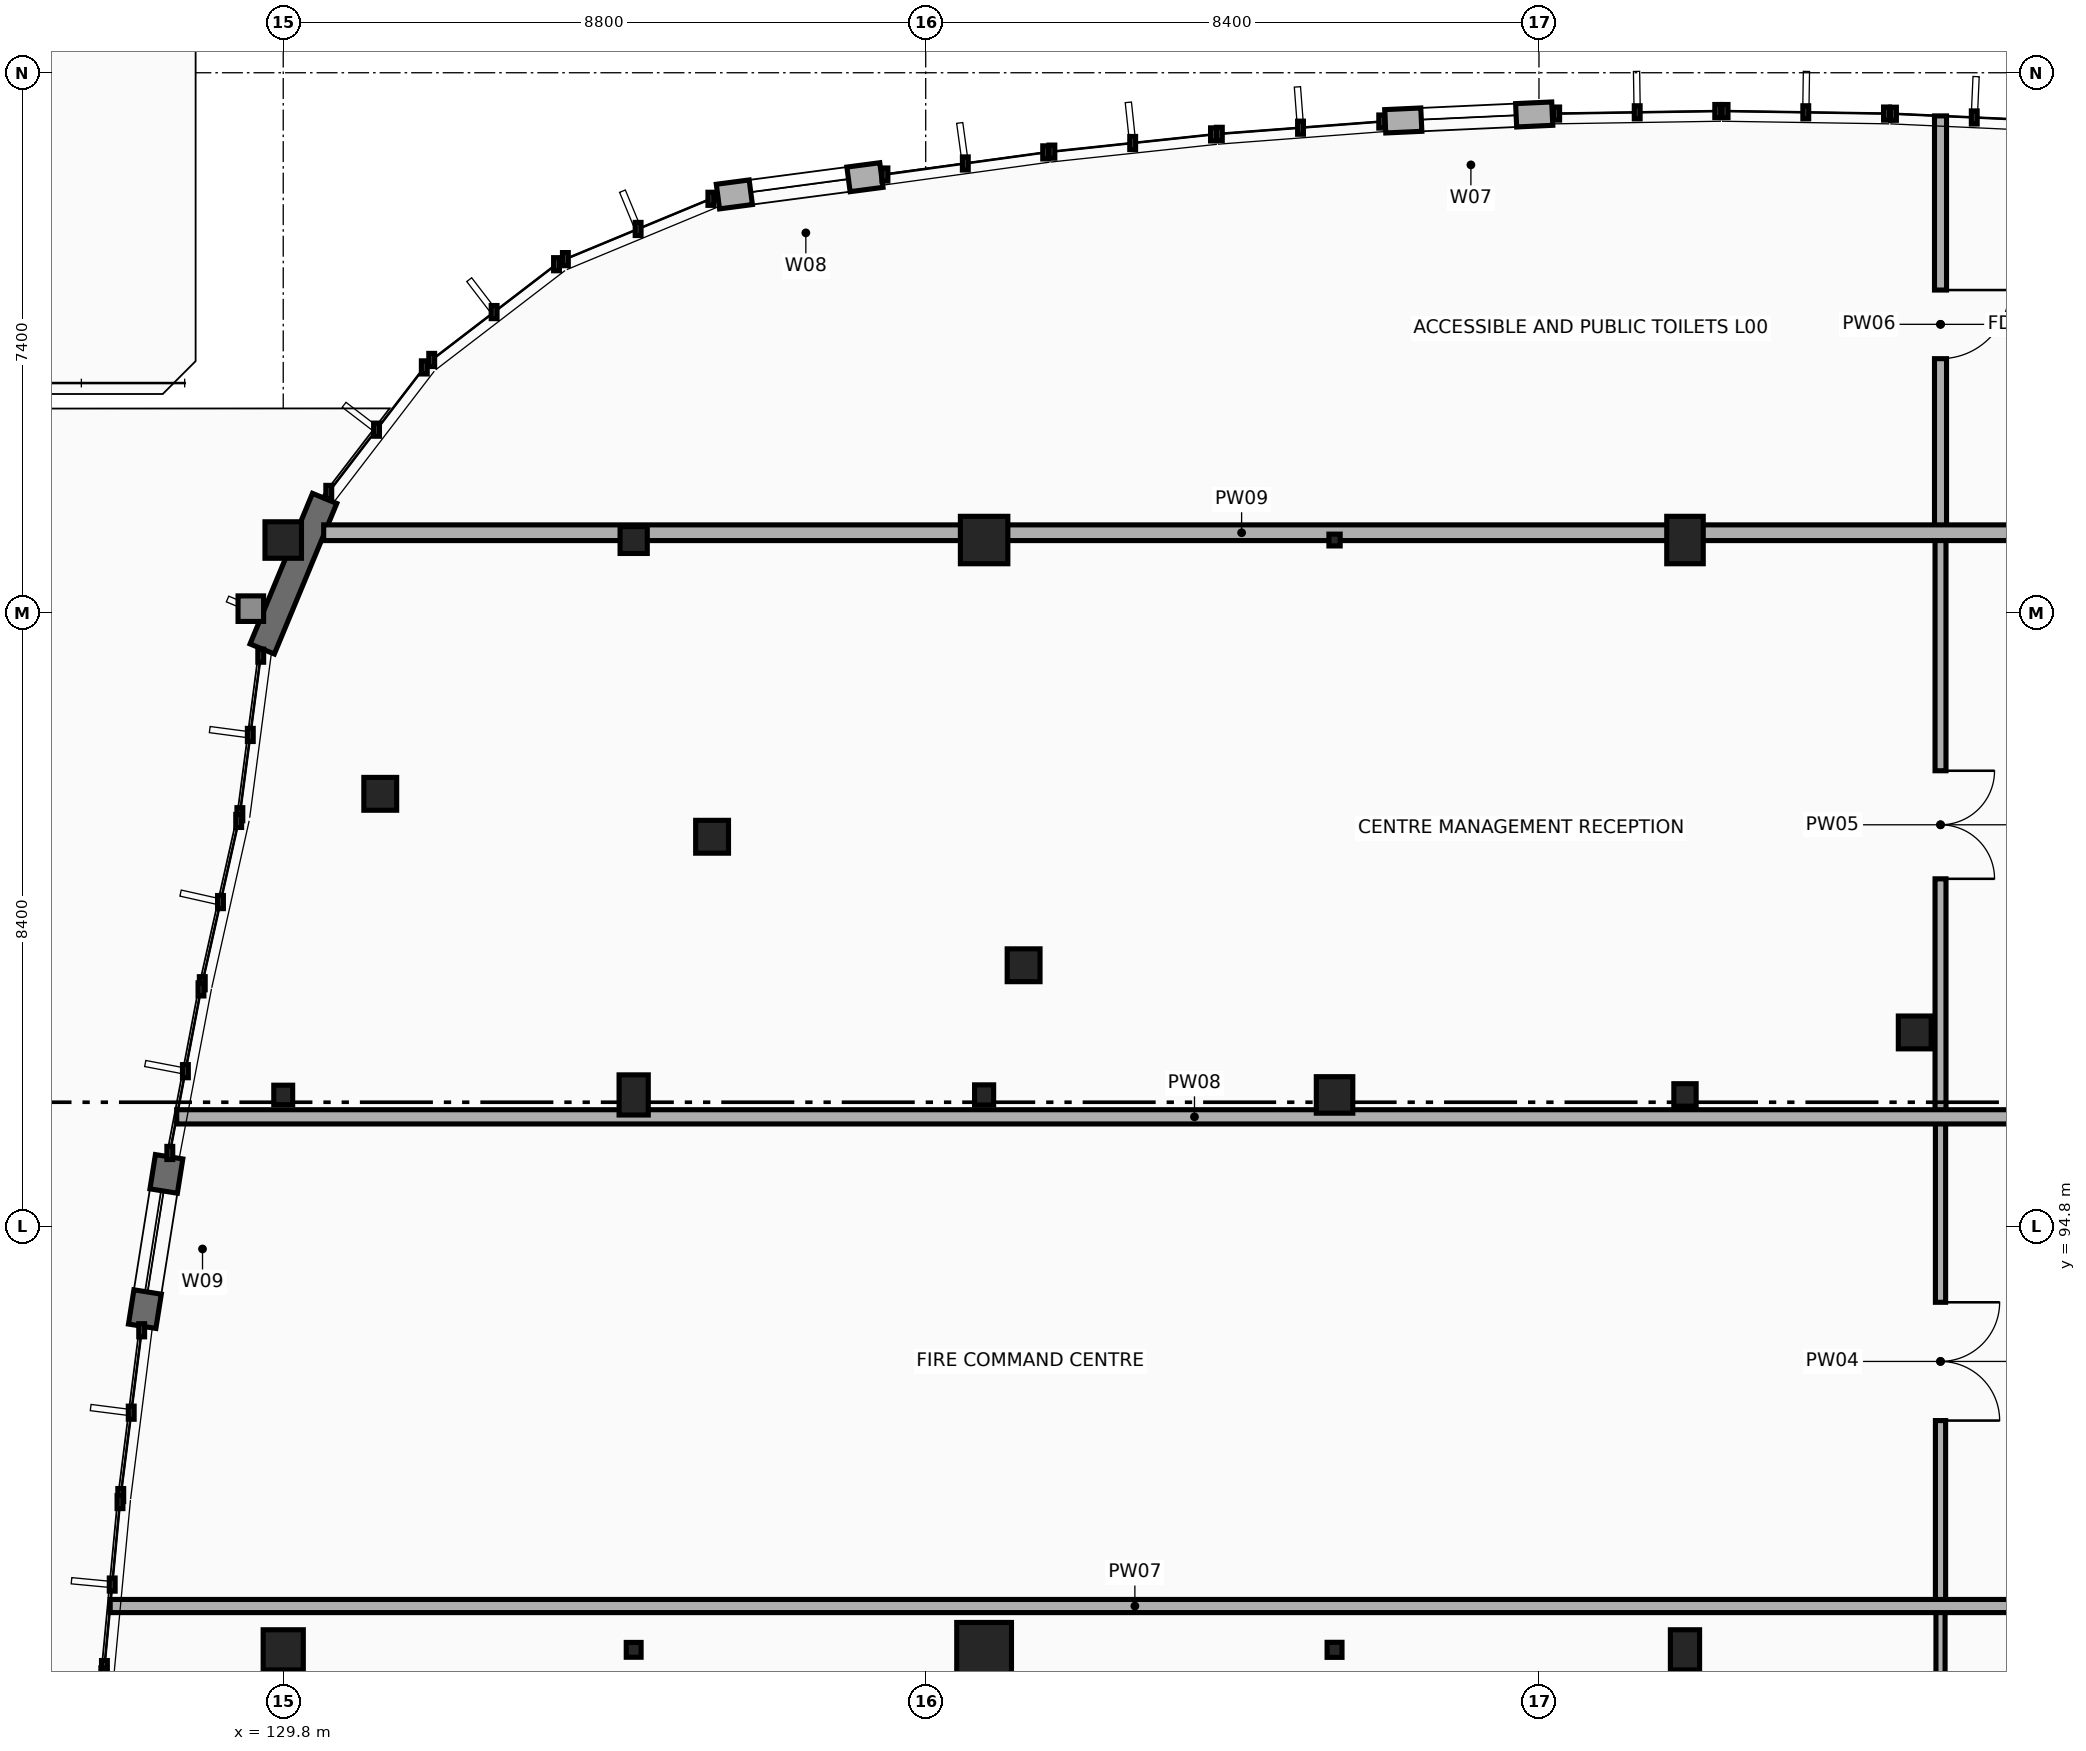
"""IFC4 building model, lengths in metres.
Left out: names, types, materials, properties, quantities, classifications, styles, units other than length and angle.
Written with IfcOpenShell. Run it as: python <this file> out.ifc"""

import sys

from ifc_helpers import new_model, si_unit, direction, frame, frame_2d, origin, origin_2d, place, context, subcontext, project, spatial, rectangle, i_section, extrude, element, fill, save


model = new_model("IFC4")
c1 = context("Model", 3, precision=1e-05, world=origin(), true_north=direction((0.0, 1.0)))
c2 = subcontext(c1, "Body", "Model", "MODEL_VIEW")
j1 = project(units=[si_unit("LENGTHUNIT", "METRE"), si_unit("PLANEANGLEUNIT", "RADIAN")], contexts=[c1])
p1 = place(None, origin())
s1 = spatial("IfcSite", under=j1, at=p1, CompositionType="ELEMENT")
p2 = place(p1, origin())
s2 = spatial("IfcBuilding", under=s1, at=p2, CompositionType="ELEMENT")
p3 = place(p2, origin())
s3 = spatial("IfcBuildingStorey", under=s2, at=p3, CompositionType="ELEMENT", Elevation=0.0)
p4 = place(p3, frame((129.8, 89.0, 0.0), z_axis=(0.0, 0.0, 1.0), x_axis=(1.0, 0.0, 0.0)))
e1 = element("IfcColumn", 1, at=p4, inside=s3, PredefinedType="COLUMN", context=c2, shape_type="SweptSolid", body=[
    extrude(rectangle(XDim=0.55, YDim=0.55, at=origin_2d()), origin(), (0.0, 0.0, 1.0), 4.8),
])
p5 = place(p3, frame((129.8, 96.6, 0.0), z_axis=(0.0, 0.0, 1.0), x_axis=(1.0, 0.0, 0.0)))
e2 = element("IfcColumn", 2, at=p5, inside=s3, PredefinedType="COLUMN", context=c2, shape_type="SweptSolid", body=[
    extrude(i_section(OverallWidth=0.259, OverallDepth=0.267, WebThickness=0.013, FlangeThickness=0.021, at=origin_2d()), origin(), (0.0, 0.0, 1.0), 4.8),
])
p6 = place(p3, frame((129.8, 104.2, 0.0), z_axis=(0.0, 0.0, 1.0), x_axis=(1.0, 0.0, 0.0)))
e3 = element("IfcColumn", 3, at=p6, inside=s3, PredefinedType="COLUMN", context=c2, shape_type="SweptSolid", body=[
    extrude(rectangle(XDim=0.5, YDim=0.5, at=origin_2d()), origin(), (0.0, 0.0, 1.0), 4.8),
])
p7 = place(p3, frame((134.6, 89.0, 0.0), z_axis=(0.0, 0.0, 1.0), x_axis=(1.0, 0.0, 0.0)))
e4 = element("IfcColumn", 4, at=p7, inside=s3, PredefinedType="COLUMN", context=c2, shape_type="SweptSolid", body=[
    extrude(i_section(OverallWidth=0.204, OverallDepth=0.203, WebThickness=0.007, FlangeThickness=0.011, at=origin_2d()), origin(), (0.0, 0.0, 1.0), 4.8),
])
p8 = place(p3, frame((134.6, 96.6, 0.0), z_axis=(0.0, 0.0, 1.0), x_axis=(1.0, 0.0, 0.0)))
e5 = element("IfcColumn", 5, at=p8, inside=s3, PredefinedType="COLUMN", context=c2, shape_type="SweptSolid", body=[
    extrude(rectangle(XDim=0.4, YDim=0.55, at=origin_2d()), origin(), (0.0, 0.0, 1.0), 4.8),
])
p9 = place(p3, frame((134.6, 104.2, 0.0), z_axis=(0.0, 0.0, 1.0), x_axis=(1.0, 0.0, 0.0)))
e6 = element("IfcColumn", 6, at=p9, inside=s3, PredefinedType="COLUMN", context=c2, shape_type="SweptSolid", body=[
    extrude(i_section(OverallWidth=0.373, OverallDepth=0.368, WebThickness=0.014, FlangeThickness=0.024, at=origin_2d()), origin(), (0.0, 0.0, 1.0), 4.8),
])
p10 = place(p3, frame((139.4, 89.0, 0.0), z_axis=(0.0, 0.0, 1.0), x_axis=(1.0, 0.0, 0.0)))
e7 = element("IfcColumn", 7, at=p10, inside=s3, PredefinedType="COLUMN", context=c2, shape_type="SweptSolid", body=[
    extrude(rectangle(XDim=0.75, YDim=0.75, at=origin_2d()), origin(), (0.0, 0.0, 1.0), 4.8),
])
p11 = place(p3, frame((139.4, 96.6, 0.0), z_axis=(0.0, 0.0, 1.0), x_axis=(1.0, 0.0, 0.0)))
e8 = element("IfcColumn", 8, at=p11, inside=s3, PredefinedType="COLUMN", context=c2, shape_type="SweptSolid", body=[
    extrude(i_section(OverallWidth=0.261, OverallDepth=0.276, WebThickness=0.015, FlangeThickness=0.025, at=origin_2d()), origin(), (0.0, 0.0, 1.0), 4.8),
])
p12 = place(p3, frame((139.4, 104.2, 0.0), z_axis=(0.0, 0.0, 1.0), x_axis=(1.0, 0.0, 0.0)))
e9 = element("IfcColumn", 9, at=p12, inside=s3, PredefinedType="COLUMN", context=c2, shape_type="SweptSolid", body=[
    extrude(rectangle(XDim=0.65, YDim=0.65, at=origin_2d()), origin(), (0.0, 0.0, 1.0), 4.8),
])
p13 = place(p3, frame((144.2, 89.0, 0.0), z_axis=(0.0, 0.0, 1.0), x_axis=(1.0, 0.0, 0.0)))
e10 = element("IfcColumn", 10, at=p13, inside=s3, PredefinedType="COLUMN", context=c2, shape_type="SweptSolid", body=[
    extrude(i_section(OverallWidth=0.204, OverallDepth=0.206, WebThickness=0.008, FlangeThickness=0.012, at=origin_2d()), origin(), (0.0, 0.0, 1.0), 4.8),
])
p14 = place(p3, frame((144.2, 96.6, 0.0), z_axis=(0.0, 0.0, 1.0), x_axis=(1.0, 0.0, 0.0)))
e11 = element("IfcColumn", 11, at=p14, inside=s3, PredefinedType="COLUMN", context=c2, shape_type="SweptSolid", body=[
    extrude(rectangle(XDim=0.5, YDim=0.5, at=origin_2d()), origin(), (0.0, 0.0, 1.0), 4.8),
])
p15 = place(p3, frame((144.2, 104.2, 0.0), z_axis=(0.0, 0.0, 1.0), x_axis=(1.0, 0.0, 0.0)))
e12 = element("IfcColumn", 12, at=p15, inside=s3, PredefinedType="COLUMN", context=c2, shape_type="SweptSolid", body=[
    extrude(i_section(OverallWidth=0.154, OverallDepth=0.162, WebThickness=0.008, FlangeThickness=0.011, at=origin_2d()), origin(), (0.0, 0.0, 1.0), 4.8),
])
p16 = place(p3, frame((149.0, 89.0, 0.0), z_axis=(0.0, 0.0, 1.0), x_axis=(1.0, 0.0, 0.0)))
e13 = element("IfcColumn", 13, at=p16, inside=s3, PredefinedType="COLUMN", context=c2, shape_type="SweptSolid", body=[
    extrude(rectangle(XDim=0.4, YDim=0.55, at=origin_2d()), origin(), (0.0, 0.0, 1.0), 4.8),
])
p17 = place(p3, frame((149.0, 96.6, 0.0), z_axis=(0.0, 0.0, 1.0), x_axis=(1.0, 0.0, 0.0)))
e14 = element("IfcColumn", 14, at=p17, inside=s3, PredefinedType="COLUMN", context=c2, shape_type="SweptSolid", body=[
    extrude(i_section(OverallWidth=0.305, OverallDepth=0.308, WebThickness=0.01, FlangeThickness=0.015, at=origin_2d()), origin(), (0.0, 0.0, 1.0), 4.8),
])
p18 = place(p3, frame((149.0, 104.2, 0.0), z_axis=(0.0, 0.0, 1.0), x_axis=(1.0, 0.0, 0.0)))
e15 = element("IfcColumn", 15, at=p18, inside=s3, PredefinedType="COLUMN", context=c2, shape_type="SweptSolid", body=[
    extrude(rectangle(XDim=0.5, YDim=0.65, at=origin_2d()), origin(), (0.0, 0.0, 1.0), 4.8),
])
p19 = place(p3, frame((131.129, 100.724, 0.0), z_axis=(0.0, 0.0, 1.0), x_axis=(1.0, 0.0, 0.0)))
e16 = element("IfcColumn", 16, at=p19, inside=s3, PredefinedType="COLUMN", context=c2, shape_type="SweptSolid", body=[
    extrude(rectangle(XDim=0.45, YDim=0.45, at=origin_2d()), origin(), (0.0, 0.0, 1.0), 4.553),
])
for number, where, z_axis, x_axis in (
    (17, (135.674, 100.136, 0.0), (0.0, 0.0, 1.0), (1.0, 0.0, 0.0)),
    (18, (139.941, 98.376, 0.0), (0.0, 0.0, 1.0), (1.0, 0.0, 0.0)),
    (19, (152.147, 97.456, 0.0), (0.0, 0.0, 1.0), (1.0, 0.0, 0.0)),
):
    element("IfcColumn", number, at=place(p3, frame(where, z_axis=z_axis, x_axis=x_axis)), inside=s3, PredefinedType="COLUMN", context=c2, shape_type="SweptSolid", body=[
        extrude(rectangle(XDim=0.45, YDim=0.45, at=origin_2d()), origin(), (0.0, 0.0, 1.0), 4.8),
    ])
p20 = place(p3, frame((144.894, 109.935, 0.0), z_axis=(0.0, 0.0, 1.0), x_axis=(0.998948885856, 0.045838013117, 0.0)))
e20 = element("IfcWall", 20, at=p20, inside=s3, PredefinedType="STANDARD", context=c2, shape_type="SweptSolid", body=[
    extrude(rectangle(XDim=2.29, YDim=0.32, at=frame_2d((1.145, 0.0))), origin(), (0.0, 0.0, 1.0), 4.512),
])
p21 = place(p20, frame((0.495, 0.0, 0.9)))
e21 = element("IfcOpeningElement", 21, at=p21, cuts=e20, PredefinedType="OPENING", context=c2, shape_type="SweptSolid", body=[
    extrude(rectangle(XDim=1.3, YDim=1.8, at=frame_2d((0.65, 0.9))), frame((0.0, 0.17, 0.0), z_axis=(0.0, -1.0, 0.0), x_axis=(1.0, 0.0, 0.0)), (0.0, 0.0, 1.0), 0.34),
])
p22 = place(p3, frame((135.754, 108.904, 0.0), z_axis=(0.0, 0.0, 1.0), x_axis=(0.991436256212, 0.130591538273, 0.0)))
e22 = element("IfcWall", 22, at=p22, inside=s3, PredefinedType="STANDARD", context=c2, shape_type="SweptSolid", body=[
    extrude(rectangle(XDim=2.258, YDim=0.34, at=frame_2d((1.129, 0.0))), origin(), (0.0, 0.0, 1.0), 4.537),
])
p23 = place(p22, frame((0.454, 0.0, 0.9)))
e23 = element("IfcOpeningElement", 23, at=p23, cuts=e22, PredefinedType="OPENING", context=c2, shape_type="SweptSolid", body=[
    extrude(rectangle(XDim=1.35, YDim=1.65, at=frame_2d((0.675, 0.825))), frame((0.0, 0.18, 0.0), z_axis=(0.0, -1.0, 0.0), x_axis=(1.0, 0.0, 0.0)), (0.0, 0.0, 1.0), 0.36),
])
p24 = place(p3, frame((129.512, 102.708, 0.0), z_axis=(0.0, 0.0, 1.0), x_axis=(0.3830150227, 0.923742113572, 0.0)))
e24 = element("IfcWall", 24, at=p24, inside=s3, PredefinedType="STANDARD", context=c2, shape_type="SweptSolid", body=[
    extrude(rectangle(XDim=2.232, YDim=0.36, at=frame_2d((1.116, 0.0))), origin(), (0.0, 0.0, 1.0), 4.125),
])
p25 = place(p3, frame((127.868, 93.432, 0.0), z_axis=(0.0, 0.0, 1.0), x_axis=(0.157066693282, 0.987587998034, 0.0)))
e25 = element("IfcWall", 25, at=p25, inside=s3, PredefinedType="STANDARD", context=c2, shape_type="SweptSolid", body=[
    extrude(rectangle(XDim=2.35, YDim=0.38, at=frame_2d((1.175, 0.0))), origin(), (0.0, 0.0, 1.0), 4.537),
])
p26 = place(p25, frame((0.475, 0.0, 0.9)))
e26 = element("IfcOpeningElement", 26, at=p26, cuts=e25, PredefinedType="OPENING", context=c2, shape_type="SweptSolid", body=[
    extrude(rectangle(XDim=1.4, YDim=2.05, at=frame_2d((0.7, 1.025))), frame((0.0, 0.2, 0.0), z_axis=(0.0, -1.0, 0.0), x_axis=(1.0, 0.0, 0.0)), (0.0, 0.0, 1.0), 0.4),
])
p27 = place(p3, frame((152.5, 89.6, 0.0), z_axis=(0.0, 0.0, 1.0), x_axis=(0.0, -1.0, 0.0)))
e27 = element("IfcWall", 27, at=p27, inside=s3, PredefinedType="PARTITIONING", context=c2, shape_type="SweptSolid", body=[
    extrude(rectangle(XDim=11.0, YDim=0.125, at=frame_2d((5.5, 0.0))), origin(), (0.0, 0.0, 1.0), 3.565),
])
p28 = place(p27, frame((4.99, 0.0, 0.0)))
e28 = element("IfcOpeningElement", 28, at=p28, cuts=e27, PredefinedType="OPENING", context=c2, shape_type="SweptSolid", body=[
    extrude(rectangle(XDim=1.02, YDim=2.14, at=frame_2d((0.51, 1.07))), frame((0.0, 0.073, 0.0), z_axis=(0.0, -1.0, 0.0), x_axis=(1.0, 0.0, 0.0)), (0.0, 0.0, 1.0), 0.145),
])
p29 = place(p3, frame((152.5, 96.3, 0.0), z_axis=(0.0, 0.0, 1.0), x_axis=(0.0, -1.0, 0.0)))
e29 = element("IfcWall", 29, at=p29, inside=s3, PredefinedType="PARTITIONING", context=c2, shape_type="SweptSolid", body=[
    extrude(rectangle(XDim=6.7, YDim=0.14, at=frame_2d((3.35, 0.0))), origin(), (0.0, 0.0, 1.0), 4.527),
])
p30 = place(p29, frame((2.54, 0.0, 0.0)))
e30 = element("IfcOpeningElement", 30, at=p30, cuts=e29, PredefinedType="OPENING", context=c2, shape_type="SweptSolid", body=[
    extrude(rectangle(XDim=1.62, YDim=2.32, at=frame_2d((0.81, 1.16))), frame((0.0, 0.08, 0.0), z_axis=(0.0, -1.0, 0.0), x_axis=(1.0, 0.0, 0.0)), (0.0, 0.0, 1.0), 0.16),
])
p31 = place(p3, frame((152.5, 104.3, 0.0), z_axis=(0.0, 0.0, 1.0), x_axis=(0.0, -1.0, 0.0)))
e31 = element("IfcWall", 31, at=p31, inside=s3, PredefinedType="PARTITIONING", context=c2, shape_type="SweptSolid", body=[
    extrude(rectangle(XDim=8.0, YDim=0.15, at=frame_2d((4.0, 0.0))), origin(), (0.0, 0.0, 1.0), 4.157),
])
p32 = place(p31, frame((3.26, 0.0, 0.0)))
e32 = element("IfcOpeningElement", 32, at=p32, cuts=e31, PredefinedType="OPENING", context=c2, shape_type="SweptSolid", body=[
    extrude(rectangle(XDim=1.48, YDim=2.22, at=frame_2d((0.74, 1.11))), frame((0.0, 0.085, 0.0), z_axis=(0.0, -1.0, 0.0), x_axis=(1.0, 0.0, 0.0)), (0.0, 0.0, 1.0), 0.17),
])
p33 = place(p3, frame((152.5, 110.009, 0.0), z_axis=(0.0, 0.0, 1.0), x_axis=(0.0, -1.0, 0.0)))
e33 = element("IfcWall", 33, at=p33, inside=s3, PredefinedType="PARTITIONING", context=c2, shape_type="SweptSolid", body=[
    extrude(rectangle(XDim=5.709, YDim=0.165, at=frame_2d((2.854, 0.0))), origin(), (0.0, 0.0, 1.0), 4.159),
])
p34 = place(p33, frame((2.385, 0.0, 0.0)))
e34 = element("IfcOpeningElement", 34, at=p34, cuts=e33, PredefinedType="OPENING", context=c2, shape_type="SweptSolid", body=[
    extrude(rectangle(XDim=0.94, YDim=2.1, at=frame_2d((0.47, 1.05))), frame((0.0, 0.093, 0.0), z_axis=(0.0, -1.0, 0.0), x_axis=(1.0, 0.0, 0.0)), (0.0, 0.0, 1.0), 0.185),
])
p35 = place(p3, frame((127.43, 89.6, 0.0), z_axis=(0.0, 0.0, 1.0), x_axis=(1.0, 0.0, 0.0)))
e35 = element("IfcWall", 35, at=p35, inside=s3, PredefinedType="PARTITIONING", context=c2, shape_type="SweptSolid", body=[
    extrude(rectangle(XDim=28.07, YDim=0.18, at=frame_2d((14.035, 0.0))), origin(), (0.0, 0.0, 1.0), 3.828),
])
p36 = place(p3, frame((128.341, 96.3, 0.0), z_axis=(0.0, 0.0, 1.0), x_axis=(1.0, 0.0, 0.0)))
e36 = element("IfcWall", 36, at=p36, inside=s3, PredefinedType="PARTITIONING", context=c2, shape_type="SweptSolid", body=[
    extrude(rectangle(XDim=27.881, YDim=0.195, at=frame_2d((13.94, 0.0))), origin(), (0.0, 0.0, 1.0), 3.753),
])
p37 = place(p3, frame((130.354, 104.3, 0.0), z_axis=(0.0, 0.0, 1.0), x_axis=(1.0, 0.0, 0.0)))
e37 = element("IfcWall", 37, at=p37, inside=s3, PredefinedType="PARTITIONING", context=c2, shape_type="SweptSolid", body=[
    extrude(rectangle(XDim=25.146, YDim=0.215, at=frame_2d((12.573, 0.0))), origin(), (0.0, 0.0, 1.0), 3.753),
])
p38 = place(p21, origin())
e38 = element("IfcWindow", 38, at=p38, inside=s3, PartitioningType="SINGLE_PANEL", PredefinedType="WINDOW", context=c2, shape_type="SweptSolid", body=[
    extrude(rectangle(XDim=1.3, YDim=1.8, at=frame_2d((0.65, 0.9))), frame((0.0, 0.03, 0.0), z_axis=(0.0, -1.0, 0.0), x_axis=(1.0, 0.0, 0.0)), (0.0, 0.0, 1.0), 0.06),
])
fill(e21, e38)
p39 = place(p23, origin())
e39 = element("IfcWindow", 39, at=p39, inside=s3, PartitioningType="SINGLE_PANEL", PredefinedType="WINDOW", context=c2, shape_type="SweptSolid", body=[
    extrude(rectangle(XDim=1.35, YDim=1.65, at=frame_2d((0.675, 0.825))), frame((0.0, 0.03, 0.0), z_axis=(0.0, -1.0, 0.0), x_axis=(1.0, 0.0, 0.0)), (0.0, 0.0, 1.0), 0.06),
])
fill(e23, e39)
p40 = place(p26, origin())
e40 = element("IfcWindow", 40, at=p40, inside=s3, PartitioningType="SINGLE_PANEL", PredefinedType="WINDOW", context=c2, shape_type="SweptSolid", body=[
    extrude(rectangle(XDim=1.4, YDim=2.05, at=frame_2d((0.7, 1.025))), frame((0.0, 0.03, 0.0), z_axis=(0.0, -1.0, 0.0), x_axis=(1.0, 0.0, 0.0)), (0.0, 0.0, 1.0), 0.06),
])
fill(e26, e40)
p41 = place(p30, origin())
e41 = element("IfcDoor", 41, at=p41, inside=s3, OperationType="DOUBLE_DOOR_SINGLE_SWING", PredefinedType="DOOR", context=c2, shape_type="SweptSolid", body=[
    extrude(rectangle(XDim=1.62, YDim=2.32, at=frame_2d((0.81, 1.16))), frame((0.0, 0.025, 0.0), z_axis=(0.0, -1.0, 0.0), x_axis=(1.0, 0.0, 0.0)), (0.0, 0.0, 1.0), 0.05),
])
fill(e30, e41)
p42 = place(p32, origin())
e42 = element("IfcDoor", 42, at=p42, inside=s3, OperationType="DOUBLE_DOOR_SINGLE_SWING", PredefinedType="DOOR", context=c2, shape_type="SweptSolid", body=[
    extrude(rectangle(XDim=1.48, YDim=2.22, at=frame_2d((0.74, 1.11))), frame((0.0, 0.025, 0.0), z_axis=(0.0, -1.0, 0.0), x_axis=(1.0, 0.0, 0.0)), (0.0, 0.0, 1.0), 0.05),
])
fill(e32, e42)
p43 = place(p34, origin())
e43 = element("IfcDoor", 43, at=p43, inside=s3, OperationType="SINGLE_SWING_LEFT", PredefinedType="DOOR", context=c2, shape_type="SweptSolid", body=[
    extrude(rectangle(XDim=0.94, YDim=2.1, at=frame_2d((0.47, 1.05))), frame((0.0, 0.025, 0.0), z_axis=(0.0, -1.0, 0.0), x_axis=(1.0, 0.0, 0.0)), (0.0, 0.0, 1.0), 0.05),
])
fill(e34, e43)
save(model, sys.argv[1])
